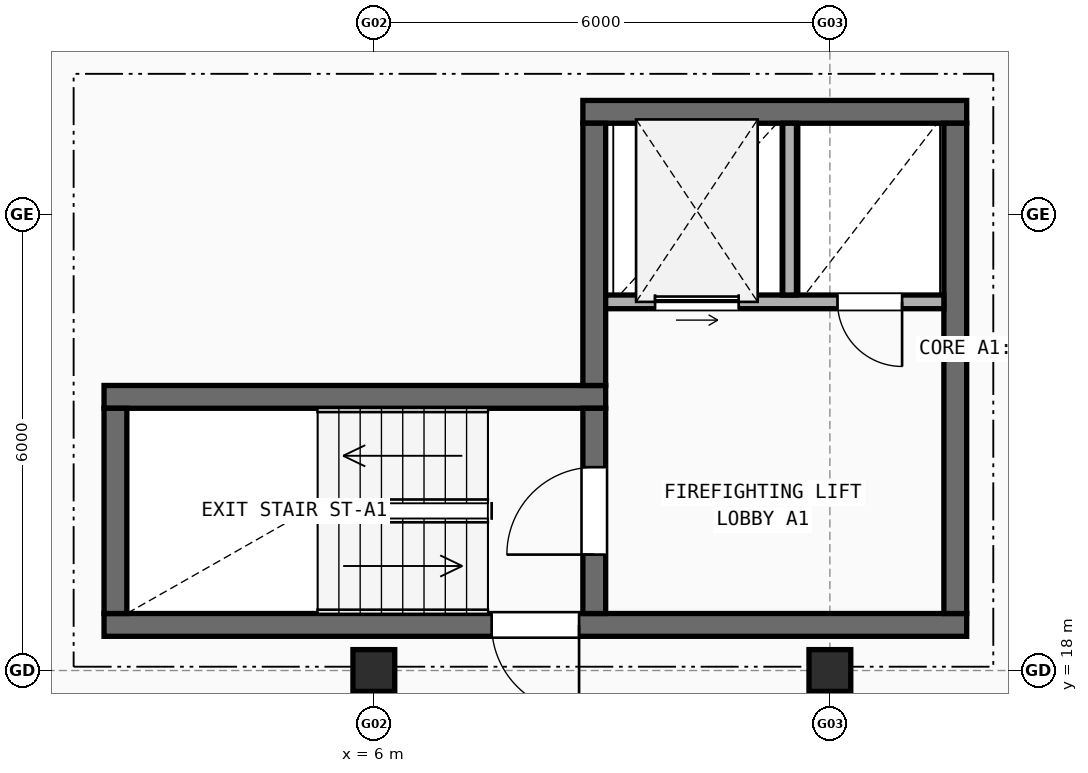
"""IFC4 building model, lengths in metres.
Left out: names, types, materials, properties, quantities, classifications, styles, units other than length and angle.
Written with IfcOpenShell. Run it as: python <this file> out.ifc"""

import sys

from ifc_helpers import new_model, si_unit, direction, frame, frame_2d, origin, origin_2d, place, context, subcontext, project, spatial, rectangle, extrude, element, fill, save


model = new_model("IFC4")
c1 = context("Model", 3, precision=1e-05, world=origin(), true_north=direction((0.0, 1.0)))
c2 = subcontext(c1, "Body", "Model", "MODEL_VIEW")
j1 = project(units=[si_unit("LENGTHUNIT", "METRE"), si_unit("PLANEANGLEUNIT", "RADIAN")], contexts=[c1])
p1 = place(None, origin())
s1 = spatial("IfcSite", under=j1, at=p1, CompositionType="ELEMENT")
p2 = place(p1, origin())
s2 = spatial("IfcBuilding", under=s1, at=p2, CompositionType="ELEMENT")
p3 = place(p2, frame((0.0, 0.0, 20.5)))
s3 = spatial("IfcBuildingStorey", under=s2, at=p3, CompositionType="ELEMENT", Elevation=20.5)
for number, where, z_axis, x_axis in (
    (1, (6.0, 18.0, 0.0), (0.0, 0.0, 1.0), (1.0, 0.0, 0.0)),
    (2, (12.0, 18.0, 0.0), (0.0, 0.0, 1.0), (1.0, 0.0, 0.0)),
):
    element("IfcColumn", number, at=place(p3, frame(where, z_axis=z_axis, x_axis=x_axis)), inside=s3, PredefinedType="COLUMN", context=c2, shape_type="SweptSolid", body=[
        extrude(rectangle(XDim=0.55, YDim=0.55, at=origin_2d()), origin(), (0.0, 0.0, 1.0), 2.97),
    ])
p4 = place(p3, frame((2.45, 18.6, 0.0), z_axis=(0.0, 0.0, 1.0), x_axis=(1.0, 0.0, 0.0)))
e3 = element("IfcWall", 3, at=p4, inside=s3, PredefinedType="SHEAR", context=c2, shape_type="SweptSolid", body=[
    extrude(rectangle(XDim=11.35, YDim=0.3, at=frame_2d((5.675, 0.0))), origin(), (0.0, 0.0, 1.0), 2.97),
])
p5 = place(p4, frame((5.1, 0.0, 0.0)))
e4 = element("IfcOpeningElement", 4, at=p5, cuts=e3, PredefinedType="OPENING", context=c2, shape_type="SweptSolid", body=[
    extrude(rectangle(XDim=1.15, YDim=2.15, at=frame_2d((0.575, 1.075))), frame((0.0, 0.16, 0.0), z_axis=(0.0, -1.0, 0.0), x_axis=(1.0, 0.0, 0.0)), (0.0, 0.0, 1.0), 0.32),
])
p6 = place(p3, frame((9.05, 21.6, 0.0), z_axis=(0.0, 0.0, 1.0), x_axis=(-1.0, 0.0, 0.0)))
e5 = element("IfcWall", 5, at=p6, inside=s3, PredefinedType="SHEAR", context=c2, shape_type="SweptSolid", body=[
    extrude(rectangle(XDim=6.6, YDim=0.3, at=frame_2d((3.3, 0.0))), origin(), (0.0, 0.0, 1.0), 2.97),
])
p7 = place(p3, frame((2.6, 21.45, 0.0), z_axis=(0.0, 0.0, 1.0), x_axis=(0.0, -1.0, 0.0)))
e6 = element("IfcWall", 6, at=p7, inside=s3, PredefinedType="SHEAR", context=c2, shape_type="SweptSolid", body=[
    extrude(rectangle(XDim=2.7, YDim=0.3, at=frame_2d((1.35, 0.0))), origin(), (0.0, 0.0, 1.0), 2.97),
])
p8 = place(p3, frame((8.9, 18.75, 0.0), z_axis=(0.0, 0.0, 1.0), x_axis=(0.0, 1.0, 0.0)))
e7 = element("IfcWall", 7, at=p8, inside=s3, PredefinedType="SHEAR", context=c2, shape_type="SweptSolid", body=[
    extrude(rectangle(XDim=2.7, YDim=0.3, at=frame_2d((1.35, 0.0))), origin(), (0.0, 0.0, 1.0), 2.97),
])
p9 = place(p8, frame((0.775, 0.0, 0.0)))
e8 = element("IfcOpeningElement", 8, at=p9, cuts=e7, PredefinedType="OPENING", context=c2, shape_type="SweptSolid", body=[
    extrude(rectangle(XDim=1.15, YDim=2.15, at=frame_2d((0.575, 1.075))), frame((0.0, 0.16, 0.0), z_axis=(0.0, -1.0, 0.0), x_axis=(1.0, 0.0, 0.0)), (0.0, 0.0, 1.0), 0.32),
])
p10 = place(p3, frame((13.8, 25.35, 0.0), z_axis=(0.0, 0.0, 1.0), x_axis=(-1.0, 0.0, 0.0)))
e9 = element("IfcWall", 9, at=p10, inside=s3, PredefinedType="SHEAR", context=c2, shape_type="SweptSolid", body=[
    extrude(rectangle(XDim=5.05, YDim=0.3, at=frame_2d((2.525, 0.0))), origin(), (0.0, 0.0, 1.0), 2.97),
])
p11 = place(p3, frame((13.65, 18.75, 0.0), z_axis=(0.0, 0.0, 1.0), x_axis=(0.0, 1.0, 0.0)))
e10 = element("IfcWall", 10, at=p11, inside=s3, PredefinedType="SHEAR", context=c2, shape_type="SweptSolid", body=[
    extrude(rectangle(XDim=6.45, YDim=0.3, at=frame_2d((3.225, 0.0))), origin(), (0.0, 0.0, 1.0), 2.97),
])
p12 = place(p3, frame((8.9, 21.75, 0.0), z_axis=(0.0, 0.0, 1.0), x_axis=(0.0, 1.0, 0.0)))
e11 = element("IfcWall", 11, at=p12, inside=s3, PredefinedType="SHEAR", context=c2, shape_type="SweptSolid", body=[
    extrude(rectangle(XDim=3.45, YDim=0.3, at=frame_2d((1.725, 0.0))), origin(), (0.0, 0.0, 1.0), 2.97),
])
p13 = place(p3, frame((9.05, 22.85, 0.0), z_axis=(0.0, 0.0, 1.0), x_axis=(1.0, 0.0, 0.0)))
e12 = element("IfcWall", 12, at=p13, inside=s3, PredefinedType="SOLIDWALL", context=c2, shape_type="SweptSolid", body=[
    extrude(rectangle(XDim=4.45, YDim=0.18, at=frame_2d((2.225, 0.0))), origin(), (0.0, 0.0, 1.0), 2.97),
])
p14 = place(p13, frame((0.65, 0.0, 0.0)))
e13 = element("IfcOpeningElement", 13, at=p14, cuts=e12, PredefinedType="OPENING", context=c2, shape_type="SweptSolid", body=[
    extrude(rectangle(XDim=1.1, YDim=2.15, at=frame_2d((0.55, 1.075))), frame((0.0, 0.1, 0.0), z_axis=(0.0, -1.0, 0.0), x_axis=(1.0, 0.0, 0.0)), (0.0, 0.0, 1.0), 0.2),
])
p15 = place(p13, frame((3.05, 0.0, 0.0)))
e14 = element("IfcOpeningElement", 14, at=p15, cuts=e12, PredefinedType="OPENING", context=c2, shape_type="SweptSolid", body=[
    extrude(rectangle(XDim=0.85, YDim=2.1, at=frame_2d((0.425, 1.05))), frame((0.0, 0.1, 0.0), z_axis=(0.0, -1.0, 0.0), x_axis=(1.0, 0.0, 0.0)), (0.0, 0.0, 1.0), 0.2),
])
p16 = place(p3, frame((11.47, 22.94, 0.0), z_axis=(0.0, 0.0, 1.0), x_axis=(0.0, 1.0, 0.0)))
e15 = element("IfcWall", 15, at=p16, inside=s3, PredefinedType="SOLIDWALL", context=c2, shape_type="SweptSolid", body=[
    extrude(rectangle(XDim=2.26, YDim=0.18, at=frame_2d((1.13, 0.0))), origin(), (0.0, 0.0, 1.0), 2.97),
])
p17 = place(p5, origin())
e16 = element("IfcDoor", 16, at=p17, inside=s3, OperationType="SINGLE_SWING_RIGHT", PredefinedType="DOOR", context=c2, shape_type="SweptSolid", body=[
    extrude(rectangle(XDim=1.15, YDim=2.15, at=frame_2d((0.575, 1.075))), frame((0.0, 0.025, 0.0), z_axis=(0.0, -1.0, 0.0), x_axis=(1.0, 0.0, 0.0)), (0.0, 0.0, 1.0), 0.05),
])
fill(e4, e16)
p18 = place(p9, origin())
e17 = element("IfcDoor", 17, at=p18, inside=s3, OperationType="SINGLE_SWING_LEFT", PredefinedType="DOOR", context=c2, shape_type="SweptSolid", body=[
    extrude(rectangle(XDim=1.15, YDim=2.15, at=frame_2d((0.575, 1.075))), frame((0.0, 0.025, 0.0), z_axis=(0.0, -1.0, 0.0), x_axis=(1.0, 0.0, 0.0)), (0.0, 0.0, 1.0), 0.05),
])
fill(e8, e17)
p19 = place(p14, origin())
e18 = element("IfcDoor", 18, at=p19, inside=s3, OperationType="SLIDING_TO_LEFT", PredefinedType="DOOR", context=c2, shape_type="SweptSolid", body=[
    extrude(rectangle(XDim=1.1, YDim=2.15, at=frame_2d((0.55, 1.075))), frame((0.0, 0.025, 0.0), z_axis=(0.0, -1.0, 0.0), x_axis=(1.0, 0.0, 0.0)), (0.0, 0.0, 1.0), 0.05),
])
fill(e13, e18)
p20 = place(p15, frame((0.85, 0.0, 0.0), z_axis=(0.0, 0.0, 1.0), x_axis=(-1.0, 0.0, 0.0)))
e19 = element("IfcDoor", 19, at=p20, inside=s3, OperationType="SINGLE_SWING_RIGHT", PredefinedType="DOOR", context=c2, shape_type="SweptSolid", body=[
    extrude(rectangle(XDim=0.85, YDim=2.1, at=frame_2d((0.425, 1.05))), frame((0.0, 0.025, 0.0), z_axis=(0.0, -1.0, 0.0), x_axis=(1.0, 0.0, 0.0)), (0.0, 0.0, 1.0), 0.05),
])
fill(e14, e19)
save(model, sys.argv[1])
